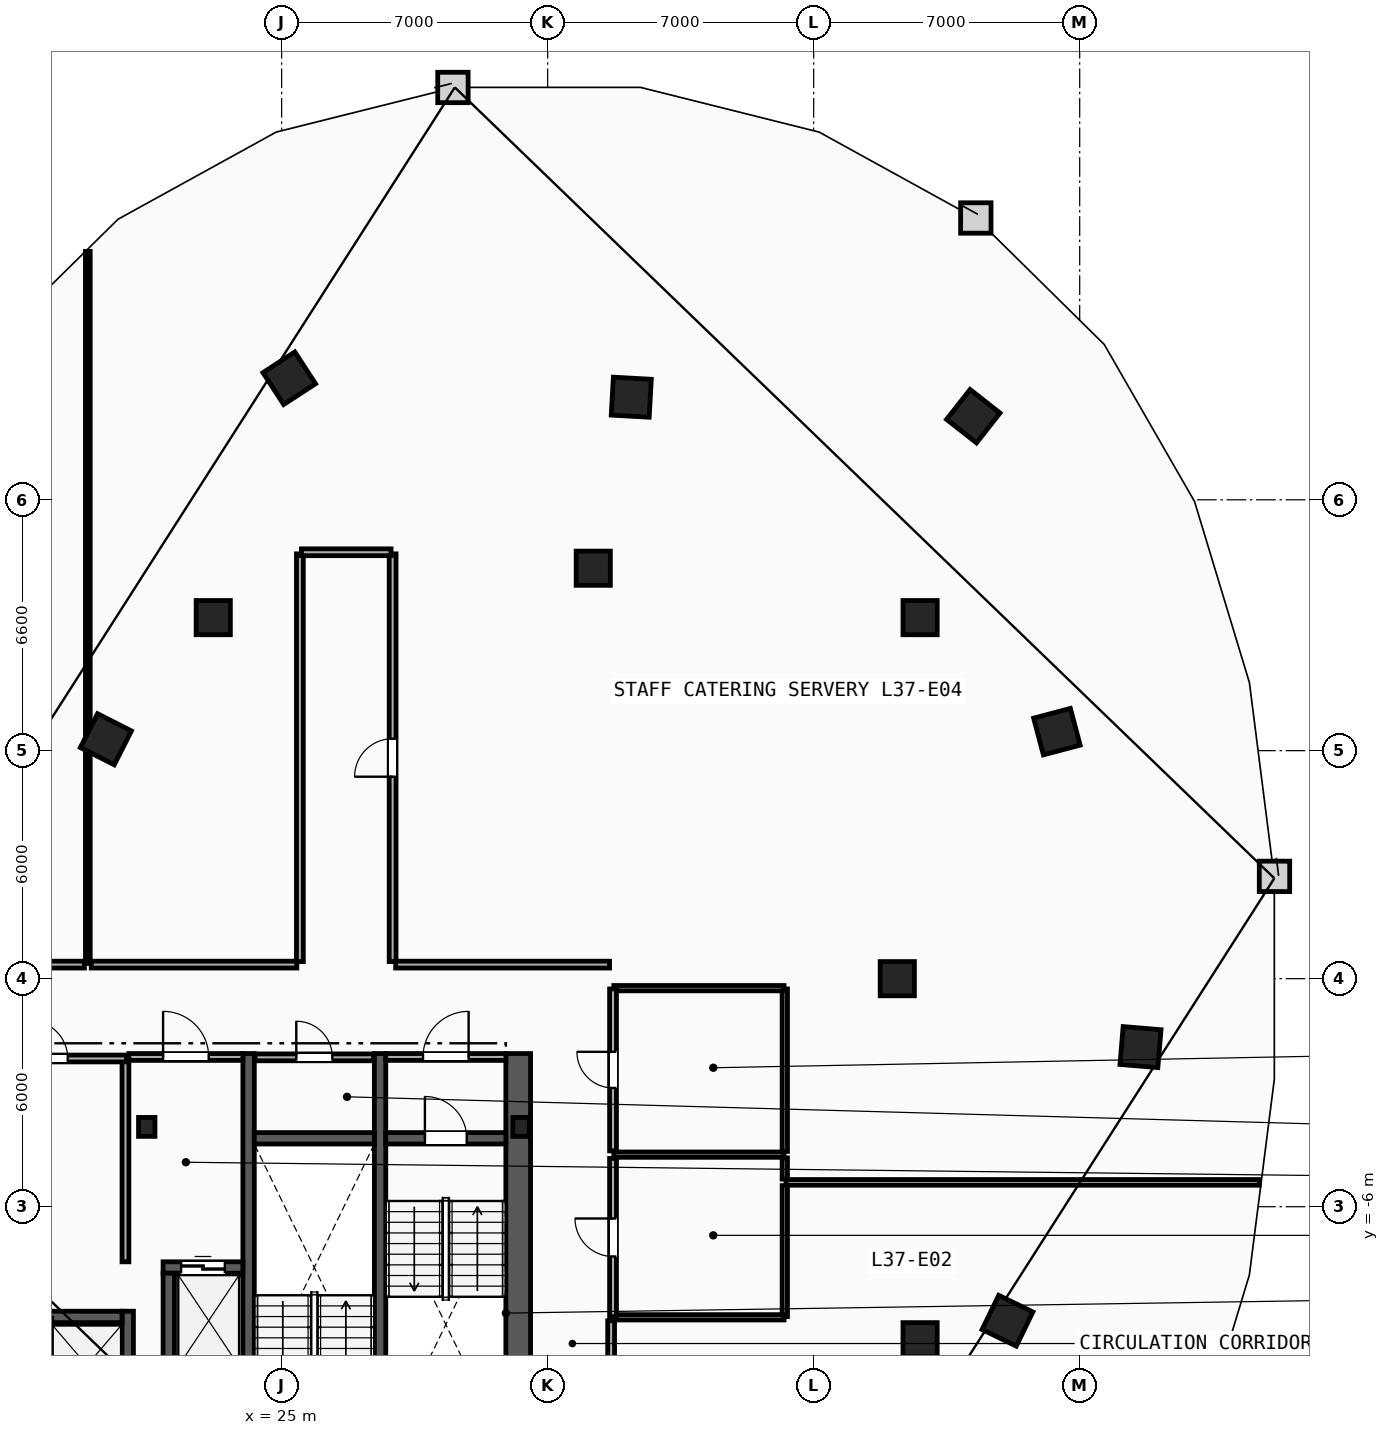
"""IFC4 building model, lengths in metres.
Left out: names, types, materials, properties, quantities, classifications, styles, units other than length and angle.
Written with IfcOpenShell. Run it as: python <this file> out.ifc"""

import sys

from ifc_helpers import new_model, si_unit, direction, frame, frame_2d, origin, origin_2d, place, context, subcontext, project, spatial, rectangle, i_section, extrude, element, fill, save


model = new_model("IFC4")
c1 = context("Model", 3, precision=1e-05, world=origin(), true_north=direction((0.0, 1.0)))
c2 = subcontext(c1, "Body", "Model", "MODEL_VIEW")
j1 = project(units=[si_unit("LENGTHUNIT", "METRE"), si_unit("PLANEANGLEUNIT", "RADIAN")], contexts=[c1])
p1 = place(None, origin())
s1 = spatial("IfcSite", under=j1, at=p1, CompositionType="ELEMENT")
p2 = place(p1, origin())
s2 = spatial("IfcBuilding", under=s1, at=p2, CompositionType="ELEMENT")
p3 = place(p2, frame((0.0, 0.0, 144.0)))
s3 = spatial("IfcBuildingStorey", under=s2, at=p3, CompositionType="ELEMENT", Elevation=144.0)
for number, where, z_axis, x_axis in (
    (1, (31.3, -3.9, 0.0), (0.0, 0.0, 1.0), (1.0, 0.0, 0.0)),
    (2, (21.45, -3.9, 0.0), (0.0, 0.0, 1.0), (1.0, 0.0, 0.0)),
):
    element("IfcColumn", number, at=place(p3, frame(where, z_axis=z_axis, x_axis=x_axis)), inside=s3, PredefinedType="COLUMN", context=c2, shape_type="SweptSolid", body=[
        extrude(i_section(OverallWidth=0.432, OverallDepth=0.498, WebThickness=0.056, FlangeThickness=0.089, FilletRadius=0.018, at=origin_2d()), origin(), (0.0, 0.0, 1.0), 3.6),
    ])
for number, where, z_axis, x_axis in (
    (3, (41.2, 0.0, 0.0), (0.0, 0.0, 1.0), (1.0, 0.0, 0.0)),
    (4, (41.8, -9.5, 0.0), (0.0, 0.0, 1.0), (1.0, 0.0, 0.0)),
    (5, (41.8, 9.5, 0.0), (0.0, 0.0, 1.0), (1.0, 0.0, 0.0)),
    (6, (33.2, 10.8, 0.0), (0.0, 0.0, 1.0), (1.0, 0.0, 0.0)),
    (7, (23.2, 9.5, 0.0), (0.0, 0.0, 1.0), (1.0, 0.0, 0.0)),
):
    element("IfcColumn", number, at=place(p3, frame(where, z_axis=z_axis, x_axis=x_axis)), inside=s3, PredefinedType="COLUMN", context=c2, shape_type="SweptSolid", body=[
        extrude(rectangle(XDim=0.9, YDim=0.9, at=origin_2d()), origin(), (0.0, 0.0, 1.0), 3.6),
    ])
for number, where, z_axis, x_axis in (
    (8, (44.1, -9.0, 0.0), (0.0, 0.0, 1.0), (0.437, 0.899, 0.0)),
    (9, (47.6, -1.8, 0.0), (0.0, 0.0, 1.0), (0.084, 0.997, 0.0)),
    (10, (45.4, 6.5, 0.0), (0.0, 0.0, 1.0), (-0.256, 0.967, 0.0)),
    (11, (43.2, 14.8, 0.0), (0.0, 0.0, 1.0), (-0.786, 0.618, 0.0)),
    (12, (34.2, 15.3, 0.0), (0.0, 0.0, 1.0), (-0.998, 0.055, 0.0)),
    (13, (25.2, 15.8, 0.0), (0.0, 0.0, 1.0), (-0.838, -0.546, 0.0)),
    (14, (20.375, 6.3, 0.0), (0.0, 0.0, 1.0), (-0.453, -0.892, 0.0)),
):
    element("IfcColumn", number, at=place(p3, frame(where, z_axis=z_axis, x_axis=x_axis)), inside=s3, PredefinedType="COLUMN", context=c2, shape_type="SweptSolid", body=[
        extrude(rectangle(XDim=1.0, YDim=1.0, at=origin_2d()), origin(), (0.0, 0.0, 1.0), 3.6),
    ])
p4 = place(p3, frame((31.225, -15.3, 0.0), z_axis=(0.0, 0.0, 1.0), x_axis=(0.0, 1.0, 0.0)))
e15 = element("IfcWall", 15, at=p4, inside=s3, PredefinedType="SHEAR", context=c2, shape_type="SweptSolid", body=[
    extrude(rectangle(XDim=13.33, YDim=0.65, at=frame_2d((6.665, 0.0))), origin(), (0.0, 0.0, 1.0), 3.36),
])
for number, where, z_axis, x_axis in (
    (16, (27.59, -12.65, 0.0), (0.0, 0.0, 1.0), (0.0, 1.0, 0.0)),
    (17, (24.13, -12.65, 0.0), (0.0, 0.0, 1.0), (0.0, 1.0, 0.0)),
):
    element("IfcWall", number, at=place(p3, frame(where, z_axis=z_axis, x_axis=x_axis)), inside=s3, PredefinedType="SHEAR", context=c2, shape_type="SweptSolid", body=[
        extrude(rectangle(XDim=10.68, YDim=0.3, at=frame_2d((5.34, 0.0))), origin(), (0.0, 0.0, 1.0), 3.36),
    ])
p5 = place(p3, frame((27.74, -4.2, 0.0), z_axis=(0.0, 0.0, 1.0), x_axis=(1.0, 0.0, 0.0)))
e18 = element("IfcWall", 18, at=p5, inside=s3, PredefinedType="SHEAR", context=c2, shape_type="SweptSolid", body=[
    extrude(rectangle(XDim=3.16, YDim=0.3, at=frame_2d((1.58, 0.0))), origin(), (0.0, 0.0, 1.0), 3.36),
])
p6 = place(p5, frame((1.03, 0.0, 0.0)))
e19 = element("IfcOpeningElement", 19, at=p6, cuts=e18, PredefinedType="OPENING", context=c2, shape_type="SweptSolid", body=[
    extrude(rectangle(XDim=1.1, YDim=2.15, at=frame_2d((0.55, 1.075))), frame((0.0, 0.16, 0.0), z_axis=(0.0, -1.0, 0.0), x_axis=(1.0, 0.0, 0.0)), (0.0, 0.0, 1.0), 0.32),
])
p7 = place(p3, frame((24.28, -4.2, 0.0), z_axis=(0.0, 0.0, 1.0), x_axis=(1.0, 0.0, 0.0)))
e20 = element("IfcWall", 20, at=p7, inside=s3, PredefinedType="SHEAR", context=c2, shape_type="SweptSolid", body=[
    extrude(rectangle(XDim=3.16, YDim=0.3, at=frame_2d((1.58, 0.0))), origin(), (0.0, 0.0, 1.0), 3.36),
])
p8 = place(p3, frame((20.89, -7.45, 0.0), z_axis=(0.0, 0.0, 1.0), x_axis=(0.0, 1.0, 0.0)))
e21 = element("IfcWall", 21, at=p8, inside=s3, PredefinedType="PARTITIONING", context=c2, shape_type="SweptSolid", body=[
    extrude(rectangle(XDim=5.3, YDim=0.18, at=frame_2d((2.65, 0.0))), origin(), (0.0, 0.0, 1.0), 3.36),
])
p9 = place(p3, frame((20.98, -2.06, 0.0), z_axis=(0.0, 0.0, 1.0), x_axis=(1.0, 0.0, 0.0)))
e22 = element("IfcWall", 22, at=p9, inside=s3, PredefinedType="PARTITIONING", context=c2, shape_type="SweptSolid", body=[
    extrude(rectangle(XDim=3.0, YDim=0.18, at=frame_2d((1.5, 0.0))), origin(), (0.0, 0.0, 1.0), 3.36),
])
p10 = place(p9, frame((0.9, 0.0, 0.0)))
e23 = element("IfcOpeningElement", 23, at=p10, cuts=e22, PredefinedType="OPENING", context=c2, shape_type="SweptSolid", body=[
    extrude(rectangle(XDim=1.2, YDim=2.15, at=frame_2d((0.6, 1.075))), frame((0.0, 0.1, 0.0), z_axis=(0.0, -1.0, 0.0), x_axis=(1.0, 0.0, 0.0)), (0.0, 0.0, 1.0), 0.2),
])
p11 = place(p3, frame((27.74, -2.06, 0.0), z_axis=(0.0, 0.0, 1.0), x_axis=(1.0, 0.0, 0.0)))
e24 = element("IfcWall", 24, at=p11, inside=s3, PredefinedType="PARTITIONING", context=c2, shape_type="SweptSolid", body=[
    extrude(rectangle(XDim=3.16, YDim=0.18, at=frame_2d((1.58, 0.0))), origin(), (0.0, 0.0, 1.0), 3.36),
])
p12 = place(p11, frame((0.98, 0.0, 0.0)))
e25 = element("IfcOpeningElement", 25, at=p12, cuts=e24, PredefinedType="OPENING", context=c2, shape_type="SweptSolid", body=[
    extrude(rectangle(XDim=1.2, YDim=2.15, at=frame_2d((0.6, 1.075))), frame((0.0, 0.1, 0.0), z_axis=(0.0, -1.0, 0.0), x_axis=(1.0, 0.0, 0.0)), (0.0, 0.0, 1.0), 0.2),
])
p13 = place(p3, frame((21.88, -7.6, 0.0), z_axis=(0.0, 0.0, 1.0), x_axis=(1.0, 0.0, 0.0)))
e26 = element("IfcWall", 26, at=p13, inside=s3, PredefinedType="SHEAR", context=c2, shape_type="SweptSolid", body=[
    extrude(rectangle(XDim=2.1, YDim=0.3, at=frame_2d((1.05, 0.0))), origin(), (0.0, 0.0, 1.0), 3.36),
])
p14 = place(p13, frame((0.475, 0.0, 0.0)))
e27 = element("IfcOpeningElement", 27, at=p14, cuts=e26, PredefinedType="OPENING", context=c2, shape_type="SweptSolid", body=[
    extrude(rectangle(XDim=1.15, YDim=2.2, at=frame_2d((0.575, 1.1))), frame((0.0, 0.16, 0.0), z_axis=(0.0, -1.0, 0.0), x_axis=(1.0, 0.0, 0.0)), (0.0, 0.0, 1.0), 0.32),
])
p15 = place(p3, frame((22.03, -10.25, 0.0), z_axis=(0.0, 0.0, 1.0), x_axis=(0.0, 1.0, 0.0)))
e28 = element("IfcWall", 28, at=p15, inside=s3, PredefinedType="SHEAR", context=c2, shape_type="SweptSolid", body=[
    extrude(rectangle(XDim=2.5, YDim=0.3, at=frame_2d((1.25, 0.0))), origin(), (0.0, 0.0, 1.0), 3.36),
])
p16 = place(p3, frame((20.95, -14.0, 0.0), z_axis=(0.0, 0.0, 1.0), x_axis=(0.0, 1.0, 0.0)))
e29 = element("IfcWall", 29, at=p16, inside=s3, PredefinedType="SHEAR", context=c2, shape_type="SweptSolid", body=[
    extrude(rectangle(XDim=5.25, YDim=0.3, at=frame_2d((2.625, 0.0))), origin(), (0.0, 0.0, 1.0), 3.36),
])
p17 = place(p3, frame((18.65, -8.9, 0.0), z_axis=(0.0, 0.0, 1.0), x_axis=(1.0, 0.0, 0.0)))
e30 = element("IfcWall", 30, at=p17, inside=s3, PredefinedType="SHEAR", context=c2, shape_type="SweptSolid", body=[
    extrude(rectangle(XDim=2.15, YDim=0.3, at=frame_2d((1.075, 0.0))), origin(), (0.0, 0.0, 1.0), 3.36),
])
p18 = place(p3, frame((24.3, -2.07, 0.0), z_axis=(0.0, 0.0, 1.0), x_axis=(1.0, 0.0, 0.0)))
e31 = element("IfcWall", 31, at=p18, inside=s3, PredefinedType="PARTITIONING", context=c2, shape_type="SweptSolid", body=[
    extrude(rectangle(XDim=3.12, YDim=0.18, at=frame_2d((1.56, 0.0))), origin(), (0.0, 0.0, 1.0), 3.36),
])
p19 = place(p18, frame((1.085, 0.0, 0.0)))
e32 = element("IfcOpeningElement", 32, at=p19, cuts=e31, PredefinedType="OPENING", context=c2, shape_type="SweptSolid", body=[
    extrude(rectangle(XDim=0.95, YDim=2.1, at=frame_2d((0.475, 1.05))), frame((0.0, 0.1, 0.0), z_axis=(0.0, -1.0, 0.0), x_axis=(1.0, 0.0, 0.0)), (0.0, 0.0, 1.0), 0.2),
])
p20 = place(p3, frame((38.24, -8.89, 0.0), z_axis=(0.0, 0.0, 1.0), x_axis=(0.0, 1.0, 0.0)))
e33 = element("IfcWall", 33, at=p20, inside=s3, PredefinedType="PARTITIONING", context=c2, shape_type="SweptSolid", body=[
    extrude(rectangle(XDim=3.445, YDim=0.14, at=frame_2d((1.722, 0.0))), origin(), (0.0, 0.0, 1.0), 3.36),
])
p21 = place(p3, frame((38.24, -5.275, 0.0), z_axis=(0.0, 0.0, 1.0), x_axis=(0.0, 1.0, 0.0)))
e34 = element("IfcWall", 34, at=p21, inside=s3, PredefinedType="PARTITIONING", context=c2, shape_type="SweptSolid", body=[
    extrude(rectangle(XDim=0.56, YDim=0.14, at=frame_2d((0.28, 0.0))), origin(), (0.0, 0.0, 1.0), 3.36),
])
p22 = place(p3, frame((38.24, -4.545, 0.0), z_axis=(0.0, 0.0, 1.0), x_axis=(0.0, 1.0, 0.0)))
e35 = element("IfcWall", 35, at=p22, inside=s3, PredefinedType="PARTITIONING", context=c2, shape_type="SweptSolid", body=[
    extrude(rectangle(XDim=4.275, YDim=0.14, at=frame_2d((2.137, 0.0))), origin(), (0.0, 0.0, 1.0), 3.36),
])
for number, where, z_axis, x_axis in (
    (36, (33.74, -0.25, 0.0), (0.0, 0.0, 1.0), (1.0, 0.0, 0.0)),
    (37, (33.74, -4.63, 0.0), (0.0, 0.0, 1.0), (1.0, 0.0, 0.0)),
    (38, (33.74, -8.91, 0.0), (0.0, 0.0, 1.0), (1.0, 0.0, 0.0)),
):
    element("IfcWall", number, at=place(p3, frame(where, z_axis=z_axis, x_axis=x_axis)), inside=s3, PredefinedType="PARTITIONING", context=c2, shape_type="SweptSolid", body=[
        extrude(rectangle(XDim=4.48, YDim=0.14, at=frame_2d((2.24, 0.0))), origin(), (0.0, 0.0, 1.0), 3.36),
    ])
p23 = place(p3, frame((33.72, -4.53, 0.0), z_axis=(0.0, 0.0, 1.0), x_axis=(0.0, 1.0, 0.0)))
e39 = element("IfcWall", 39, at=p23, inside=s3, PredefinedType="PARTITIONING", context=c2, shape_type="SweptSolid", body=[
    extrude(rectangle(XDim=4.26, YDim=0.18, at=frame_2d((2.13, 0.0))), origin(), (0.0, 0.0, 1.0), 3.36),
])
p24 = place(p23, frame((1.655, 0.0, 0.0)))
e40 = element("IfcOpeningElement", 40, at=p24, cuts=e39, PredefinedType="OPENING", context=c2, shape_type="SweptSolid", body=[
    extrude(rectangle(XDim=0.95, YDim=2.1, at=frame_2d((0.475, 1.05))), frame((0.0, 0.1, 0.0), z_axis=(0.0, -1.0, 0.0), x_axis=(1.0, 0.0, 0.0)), (0.0, 0.0, 1.0), 0.2),
])
p25 = place(p3, frame((33.72, -8.89, 0.0), z_axis=(0.0, 0.0, 1.0), x_axis=(0.0, 1.0, 0.0)))
e41 = element("IfcWall", 41, at=p25, inside=s3, PredefinedType="PARTITIONING", context=c2, shape_type="SweptSolid", body=[
    extrude(rectangle(XDim=4.16, YDim=0.18, at=frame_2d((2.08, 0.0))), origin(), (0.0, 0.0, 1.0), 3.36),
])
p26 = place(p25, frame((1.58, 0.0, 0.0)))
e42 = element("IfcOpeningElement", 42, at=p26, cuts=e41, PredefinedType="OPENING", context=c2, shape_type="SweptSolid", body=[
    extrude(rectangle(XDim=1.0, YDim=2.15, at=frame_2d((0.5, 1.075))), frame((0.0, 0.1, 0.0), z_axis=(0.0, -1.0, 0.0), x_axis=(1.0, 0.0, 0.0)), (0.0, 0.0, 1.0), 0.2),
])
p27 = place(p3, frame((19.9, 0.4, 0.0), z_axis=(0.0, 0.0, 1.0), x_axis=(0.0, 1.0, 0.0)))
e43 = element("IfcWall", 43, at=p27, inside=s3, PredefinedType="PARTITIONING", context=c2, shape_type="SweptSolid", body=[
    extrude(rectangle(XDim=18.737, YDim=0.125, at=frame_2d((9.368, 0.0))), origin(), (0.0, 0.0, 1.0), 3.36),
])
p28 = place(p3, frame((38.27, -5.36, 0.0), z_axis=(0.0, 0.0, 1.0), x_axis=(1.0, 0.0, 0.0)))
e44 = element("IfcWall", 44, at=p28, inside=s3, PredefinedType="PARTITIONING", context=c2, shape_type="SweptSolid", body=[
    extrude(rectangle(XDim=12.455, YDim=0.15, at=frame_2d((6.228, 0.0))), origin(), (0.0, 0.0, 1.0), 3.36),
])
p29 = place(p3, frame((33.67, -10.27, 0.0), z_axis=(0.0, 0.0, 1.0), x_axis=(0.0, 1.0, 0.0)))
e45 = element("IfcWall", 45, at=p29, inside=s3, PredefinedType="PARTITIONING", context=c2, shape_type="SweptSolid", body=[
    extrude(rectangle(XDim=1.269, YDim=0.18, at=frame_2d((0.634, 0.0))), origin(), (0.0, 0.0, 1.0), 3.36),
])
p30 = place(p3, frame((16.822, -2.1, 0.0), z_axis=(0.0, 0.0, 1.0), x_axis=(1.0, 0.0, 0.0)))
e46 = element("IfcWall", 46, at=p30, inside=s3, PredefinedType="PARTITIONING", context=c2, shape_type="SweptSolid", body=[
    extrude(rectangle(XDim=4.098, YDim=0.18, at=frame_2d((2.049, 0.0))), origin(), (0.0, 0.0, 1.0), 3.36),
])
p31 = place(p30, frame((1.549, 0.0, 0.0)))
e47 = element("IfcOpeningElement", 47, at=p31, cuts=e46, PredefinedType="OPENING", context=c2, shape_type="SweptSolid", body=[
    extrude(rectangle(XDim=1.0, YDim=2.15, at=frame_2d((0.5, 1.075))), frame((0.0, 0.1, 0.0), z_axis=(0.0, -1.0, 0.0), x_axis=(1.0, 0.0, 0.0)), (0.0, 0.0, 1.0), 0.2),
])
p32 = place(p3, frame((19.81, 0.37, 0.0), z_axis=(0.0, 0.0, 1.0), x_axis=(-1.0, 0.0, 0.0)))
e48 = element("IfcWall", 48, at=p32, inside=s3, PredefinedType="PARTITIONING", context=c2, shape_type="SweptSolid", body=[
    extrude(rectangle(XDim=2.989, YDim=0.18, at=frame_2d((1.494, 0.0))), origin(), (0.0, 0.0, 1.0), 3.36),
])
p33 = place(p3, frame((27.92, 0.45, 0.0), z_axis=(0.0, 0.0, 1.0), x_axis=(0.0, 1.0, 0.0)))
e49 = element("IfcWall", 49, at=p33, inside=s3, PredefinedType="PARTITIONING", context=c2, shape_type="SweptSolid", body=[
    extrude(rectangle(XDim=10.729, YDim=0.18, at=frame_2d((5.364, 0.0))), origin(), (0.0, 0.0, 1.0), 3.36),
])
p34 = place(p33, frame((4.864, 0.0, 0.0)))
e50 = element("IfcOpeningElement", 50, at=p34, cuts=e49, PredefinedType="OPENING", context=c2, shape_type="SweptSolid", body=[
    extrude(rectangle(XDim=1.0, YDim=2.15, at=frame_2d((0.5, 1.075))), frame((0.0, 0.1, 0.0), z_axis=(0.0, -1.0, 0.0), x_axis=(1.0, 0.0, 0.0)), (0.0, 0.0, 1.0), 0.2),
])
p35 = place(p3, frame((25.48, 11.178, 0.0), z_axis=(0.0, 0.0, 1.0), x_axis=(0.0, -1.0, 0.0)))
e51 = element("IfcWall", 51, at=p35, inside=s3, PredefinedType="PARTITIONING", context=c2, shape_type="SweptSolid", body=[
    extrude(rectangle(XDim=10.729, YDim=0.18, at=frame_2d((5.364, 0.0))), origin(), (0.0, 0.0, 1.0), 3.36),
])
p36 = place(p3, frame((33.628, 0.37, 0.0), z_axis=(0.0, 0.0, 1.0), x_axis=(-1.0, 0.0, 0.0)))
e52 = element("IfcWall", 52, at=p36, inside=s3, PredefinedType="PARTITIONING", context=c2, shape_type="SweptSolid", body=[
    extrude(rectangle(XDim=5.628, YDim=0.18, at=frame_2d((2.814, 0.0))), origin(), (0.0, 0.0, 1.0), 3.36),
])
p37 = place(p3, frame((25.4, 0.37, 0.0), z_axis=(0.0, 0.0, 1.0), x_axis=(-1.0, 0.0, 0.0)))
e53 = element("IfcWall", 53, at=p37, inside=s3, PredefinedType="PARTITIONING", context=c2, shape_type="SweptSolid", body=[
    extrude(rectangle(XDim=5.41, YDim=0.18, at=frame_2d((2.705, 0.0))), origin(), (0.0, 0.0, 1.0), 3.36),
])
p38 = place(p3, frame((27.878, 11.22, 0.0), z_axis=(0.0, 0.0, 1.0), x_axis=(-1.0, 0.0, 0.0)))
e54 = element("IfcWall", 54, at=p38, inside=s3, PredefinedType="PARTITIONING", context=c2, shape_type="SweptSolid", body=[
    extrude(rectangle(XDim=2.357, YDim=0.18, at=frame_2d((1.178, 0.0))), origin(), (0.0, 0.0, 1.0), 3.36),
])
p39 = place(p6, origin())
e55 = element("IfcDoor", 55, at=p39, inside=s3, OperationType="SINGLE_SWING_LEFT", PredefinedType="DOOR", context=c2, shape_type="SweptSolid", body=[
    extrude(rectangle(XDim=1.1, YDim=2.15, at=frame_2d((0.55, 1.075))), frame((0.0, 0.025, 0.0), z_axis=(0.0, -1.0, 0.0), x_axis=(1.0, 0.0, 0.0)), (0.0, 0.0, 1.0), 0.05),
])
fill(e19, e55)
p40 = place(p10, origin())
e56 = element("IfcDoor", 56, at=p40, inside=s3, OperationType="SINGLE_SWING_LEFT", PredefinedType="DOOR", context=c2, shape_type="SweptSolid", body=[
    extrude(rectangle(XDim=1.2, YDim=2.15, at=frame_2d((0.6, 1.075))), frame((0.0, 0.025, 0.0), z_axis=(0.0, -1.0, 0.0), x_axis=(1.0, 0.0, 0.0)), (0.0, 0.0, 1.0), 0.05),
])
fill(e23, e56)
p41 = place(p12, origin())
e57 = element("IfcDoor", 57, at=p41, inside=s3, OperationType="SINGLE_SWING_RIGHT", PredefinedType="DOOR", context=c2, shape_type="SweptSolid", body=[
    extrude(rectangle(XDim=1.2, YDim=2.15, at=frame_2d((0.6, 1.075))), frame((0.0, 0.025, 0.0), z_axis=(0.0, -1.0, 0.0), x_axis=(1.0, 0.0, 0.0)), (0.0, 0.0, 1.0), 0.05),
])
fill(e25, e57)
p42 = place(p14, origin())
e58 = element("IfcDoor", 58, at=p42, inside=s3, OperationType="SLIDING_TO_LEFT", PredefinedType="TRAPDOOR", context=c2, shape_type="SweptSolid", body=[
    extrude(rectangle(XDim=1.15, YDim=2.2, at=frame_2d((0.575, 1.1))), frame((0.0, 0.025, 0.0), z_axis=(0.0, -1.0, 0.0), x_axis=(1.0, 0.0, 0.0)), (0.0, 0.0, 1.0), 0.05),
])
fill(e27, e58)
p43 = place(p34, origin())
e59 = element("IfcDoor", 59, at=p43, inside=s3, OperationType="SINGLE_SWING_LEFT", PredefinedType="DOOR", context=c2, shape_type="SweptSolid", body=[
    extrude(rectangle(XDim=1.0, YDim=2.15, at=frame_2d((0.5, 1.075))), frame((0.0, 0.025, 0.0), z_axis=(0.0, -1.0, 0.0), x_axis=(1.0, 0.0, 0.0)), (0.0, 0.0, 1.0), 0.05),
])
fill(e50, e59)
p44 = place(p24, origin())
e60 = element("IfcDoor", 60, at=p44, inside=s3, OperationType="SINGLE_SWING_RIGHT", PredefinedType="DOOR", context=c2, shape_type="SweptSolid", body=[
    extrude(rectangle(XDim=0.95, YDim=2.1, at=frame_2d((0.475, 1.05))), frame((0.0, 0.025, 0.0), z_axis=(0.0, -1.0, 0.0), x_axis=(1.0, 0.0, 0.0)), (0.0, 0.0, 1.0), 0.05),
])
fill(e40, e60)
p45 = place(p26, origin())
e61 = element("IfcDoor", 61, at=p45, inside=s3, OperationType="SINGLE_SWING_RIGHT", PredefinedType="DOOR", context=c2, shape_type="SweptSolid", body=[
    extrude(rectangle(XDim=1.0, YDim=2.15, at=frame_2d((0.5, 1.075))), frame((0.0, 0.025, 0.0), z_axis=(0.0, -1.0, 0.0), x_axis=(1.0, 0.0, 0.0)), (0.0, 0.0, 1.0), 0.05),
])
fill(e42, e61)
p46 = place(p31, origin())
e62 = element("IfcDoor", 62, at=p46, inside=s3, OperationType="SINGLE_SWING_LEFT", PredefinedType="DOOR", context=c2, shape_type="SweptSolid", body=[
    extrude(rectangle(XDim=1.0, YDim=2.15, at=frame_2d((0.5, 1.075))), frame((0.0, 0.025, 0.0), z_axis=(0.0, -1.0, 0.0), x_axis=(1.0, 0.0, 0.0)), (0.0, 0.0, 1.0), 0.05),
])
fill(e47, e62)
p47 = place(p19, origin())
e63 = element("IfcDoor", 63, at=p47, inside=s3, OperationType="SINGLE_SWING_LEFT", PredefinedType="DOOR", context=c2, shape_type="SweptSolid", body=[
    extrude(rectangle(XDim=0.95, YDim=2.1, at=frame_2d((0.475, 1.05))), frame((0.0, 0.025, 0.0), z_axis=(0.0, -1.0, 0.0), x_axis=(1.0, 0.0, 0.0)), (0.0, 0.0, 1.0), 0.05),
])
fill(e32, e63)
save(model, sys.argv[1])
